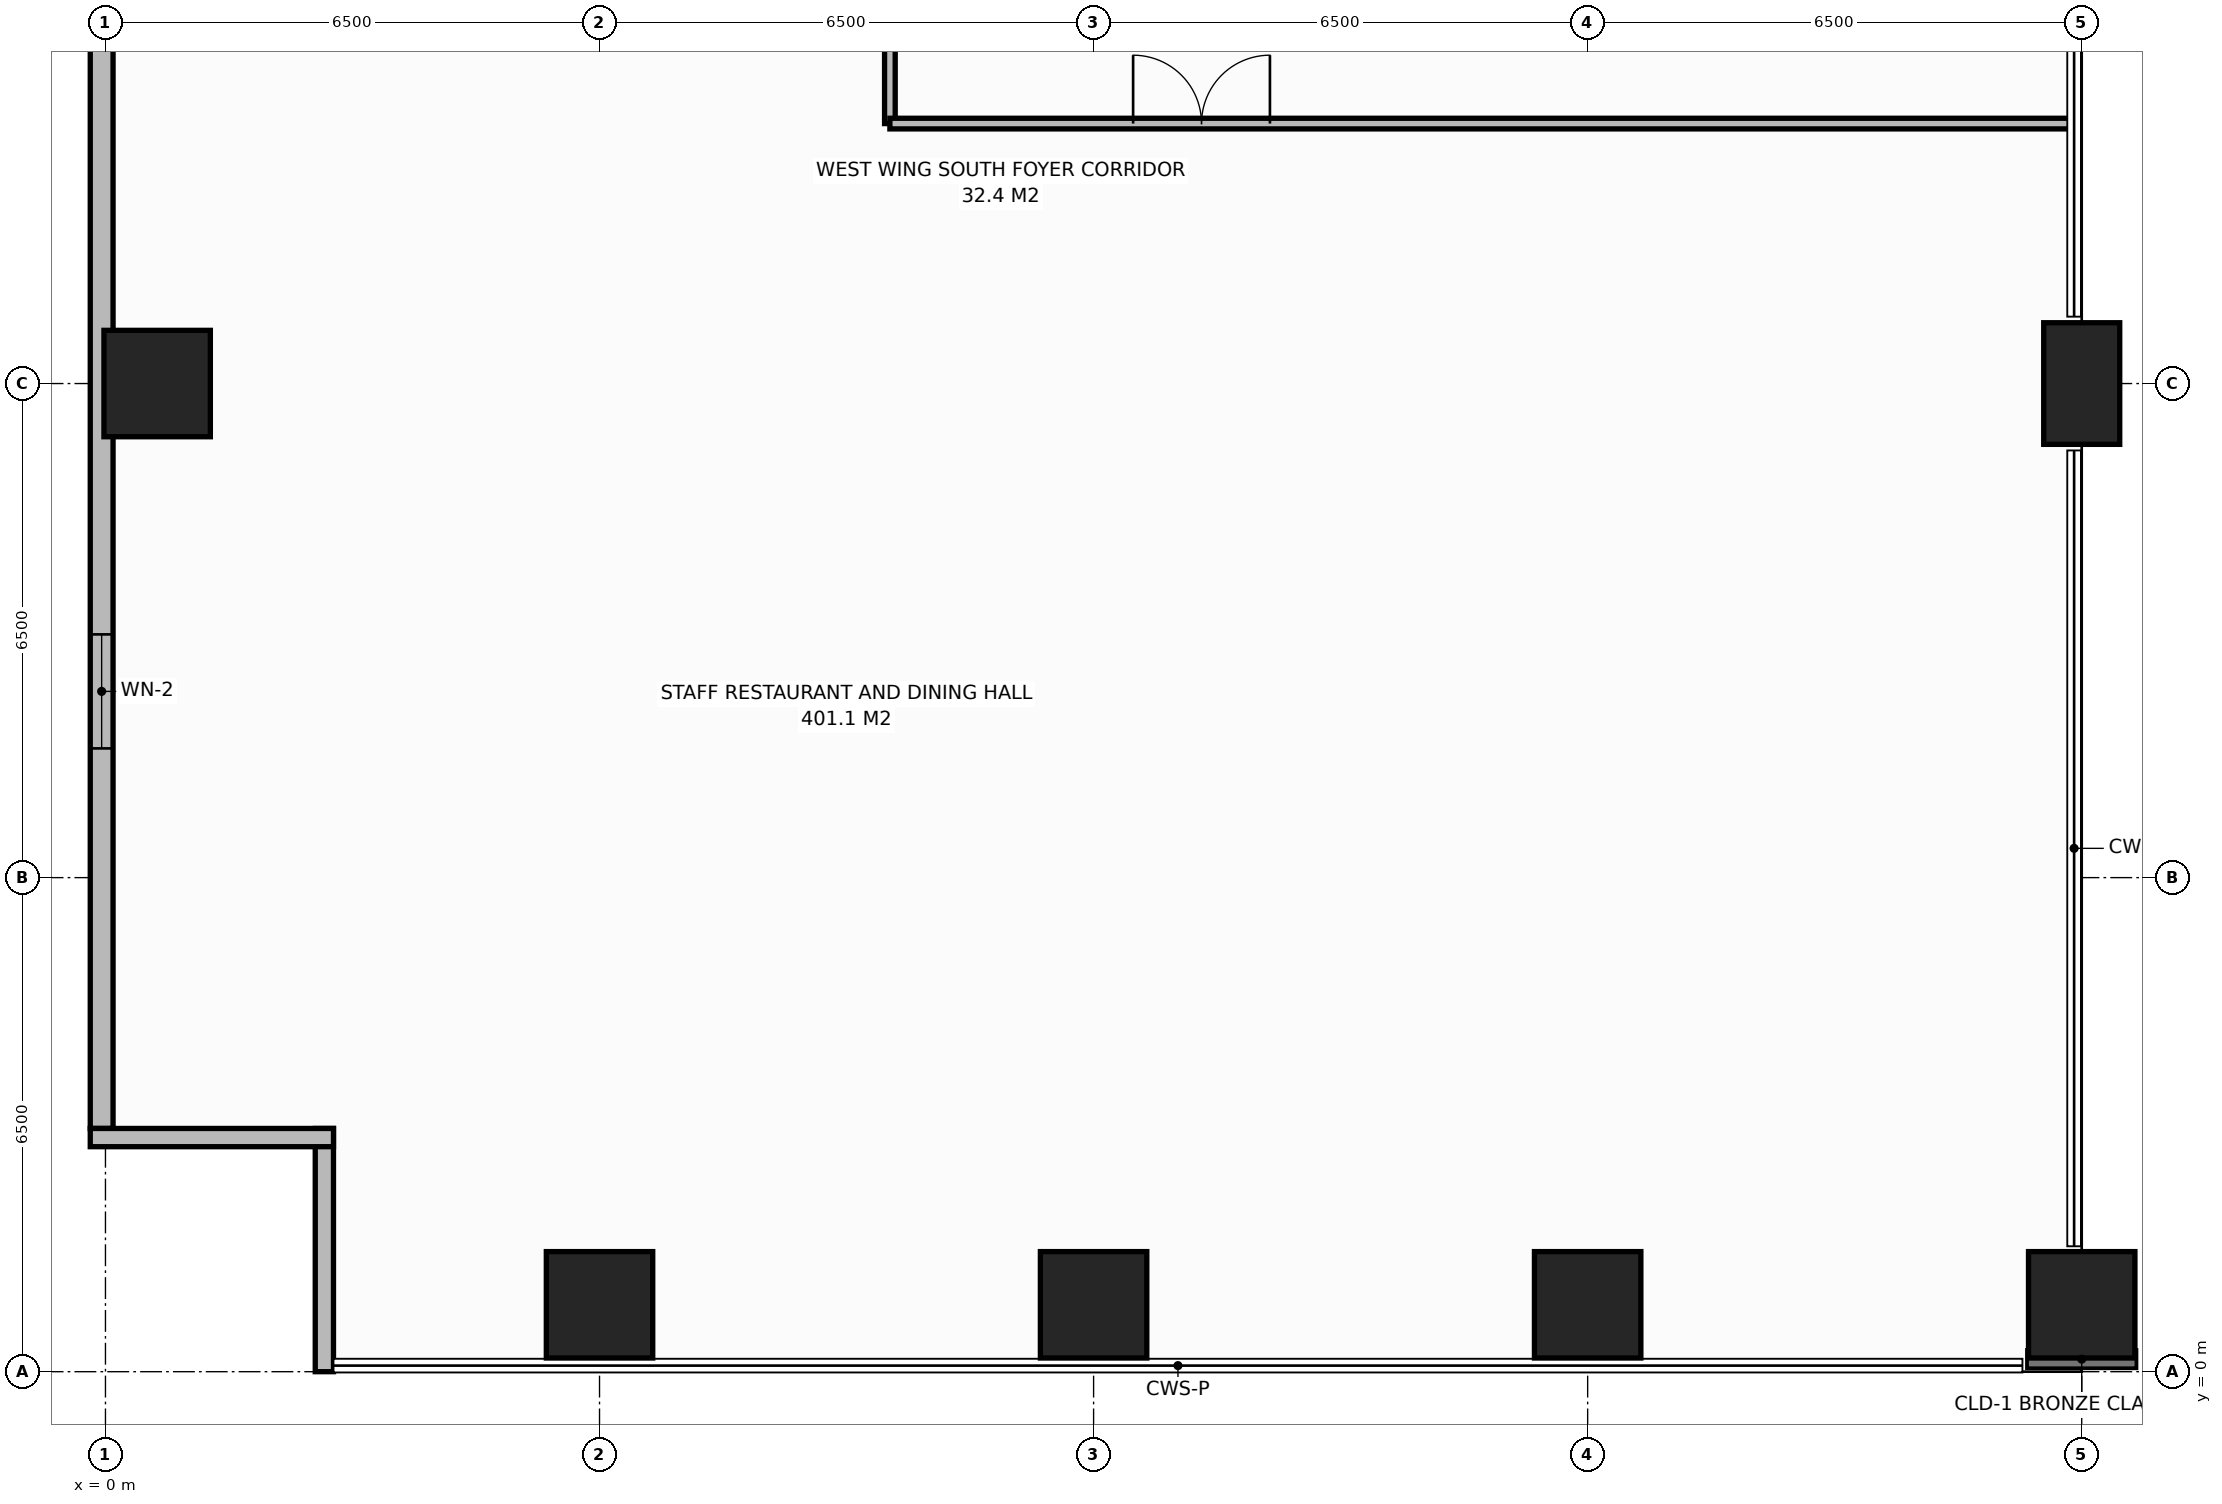
"""IFC4 building model, lengths in metres.
Left out: names, types, materials, properties, quantities, classifications, styles, units other than length and angle.
Written with IfcOpenShell. Run it as: python <this file> out.ifc"""

import sys

from ifc_helpers import new_model, si_unit, direction, frame, frame_2d, origin, origin_2d, place, context, subcontext, project, spatial, rectangle, extrude, element, fill, save


model = new_model("IFC4")
c1 = context("Model", 3, precision=1e-05, world=origin(), true_north=direction((0.0, 1.0)))
c2 = subcontext(c1, "Body", "Model", "MODEL_VIEW")
j1 = project(units=[si_unit("LENGTHUNIT", "METRE"), si_unit("PLANEANGLEUNIT", "RADIAN")], contexts=[c1])
p1 = place(None, origin())
s1 = spatial("IfcSite", under=j1, at=p1, CompositionType="ELEMENT")
p2 = place(p1, origin())
s2 = spatial("IfcBuilding", under=s1, at=p2, CompositionType="ELEMENT")
p3 = place(p2, frame((0.0, 0.0, 17.0)))
s3 = spatial("IfcBuildingStorey", under=s2, at=p3, CompositionType="ELEMENT", Elevation=17.0)
p4 = place(p3, frame((26.0, 13.0, 0.0), z_axis=(0.0, 0.0, 1.0), x_axis=(1.0, 0.0, 0.0)))
e1 = element("IfcColumn", 1, at=p4, inside=s3, PredefinedType="PILASTER", context=c2, shape_type="SweptSolid", body=[
    extrude(rectangle(XDim=1.0, YDim=1.6, at=origin_2d()), origin(), (0.0, 0.0, 1.0), 5.0),
])
for number, where, z_axis, x_axis in (
    (2, (6.5, 0.88, 0.0), (0.0, 0.0, 1.0), (1.0, 0.0, 0.0)),
    (3, (13.0, 0.88, 0.0), (0.0, 0.0, 1.0), (1.0, 0.0, 0.0)),
    (4, (19.5, 0.88, 0.0), (0.0, 0.0, 1.0), (1.0, 0.0, 0.0)),
    (5, (26.0, 0.88, 0.0), (0.0, 0.0, 1.0), (1.0, 0.0, 0.0)),
    (6, (0.68, 13.0, 0.0), (0.0, 0.0, 1.0), (1.0, 0.0, 0.0)),
):
    element("IfcColumn", number, at=place(p3, frame(where, z_axis=z_axis, x_axis=x_axis)), inside=s3, PredefinedType="COLUMN", context=c2, shape_type="SweptSolid", body=[
        extrude(rectangle(XDim=1.4, YDim=1.4, at=origin_2d()), origin(), (0.0, 0.0, 1.0), 5.0),
    ])
p5 = place(p3, frame((-0.05, 3.2, 0.0), z_axis=(0.0, 0.0, 1.0), x_axis=(0.0, 1.0, 0.0)))
e7 = element("IfcWall", 7, at=p5, inside=s3, PredefinedType="STANDARD", context=c2, shape_type="SweptSolid", body=[
    extrude(rectangle(XDim=45.6, YDim=0.3, at=frame_2d((22.8, 0.0))), origin(), (0.0, 0.0, 1.0), 4.4),
])
p6 = place(p5, frame((5.0, 0.0, 0.9)))
e8 = element("IfcOpeningElement", 8, at=p6, cuts=e7, PredefinedType="OPENING", context=c2, shape_type="SweptSolid", body=[
    extrude(rectangle(XDim=1.5, YDim=2.2, at=frame_2d((0.75, 1.1))), frame((0.0, 0.16, 0.0), z_axis=(0.0, -1.0, 0.0), x_axis=(1.0, 0.0, 0.0)), (0.0, 0.0, 1.0), 0.32),
])
p7 = place(p5, frame((14.5, 0.0, 0.9)))
e9 = element("IfcOpeningElement", 9, at=p7, cuts=e7, PredefinedType="OPENING", context=c2, shape_type="SweptSolid", body=[
    extrude(rectangle(XDim=1.5, YDim=2.2, at=frame_2d((0.75, 1.1))), frame((0.0, 0.16, 0.0), z_axis=(0.0, -1.0, 0.0), x_axis=(1.0, 0.0, 0.0)), (0.0, 0.0, 1.0), 0.32),
])
p8 = place(p5, frame((25.5, 0.0, 0.9)))
e10 = element("IfcOpeningElement", 10, at=p8, cuts=e7, PredefinedType="OPENING", context=c2, shape_type="SweptSolid", body=[
    extrude(rectangle(XDim=1.5, YDim=2.2, at=frame_2d((0.75, 1.1))), frame((0.0, 0.16, 0.0), z_axis=(0.0, -1.0, 0.0), x_axis=(1.0, 0.0, 0.0)), (0.0, 0.0, 1.0), 0.32),
])
p9 = place(p5, frame((35.0, 0.0, 0.9)))
e11 = element("IfcOpeningElement", 11, at=p9, cuts=e7, PredefinedType="OPENING", context=c2, shape_type="SweptSolid", body=[
    extrude(rectangle(XDim=1.5, YDim=2.2, at=frame_2d((0.75, 1.1))), frame((0.0, 0.16, 0.0), z_axis=(0.0, -1.0, 0.0), x_axis=(1.0, 0.0, 0.0)), (0.0, 0.0, 1.0), 0.32),
])
for number, where, z_axis, x_axis in (
    (12, (2.88, 0.0, 0.0), (0.0, 0.0, 1.0), (0.0, 1.0, 0.0)),
    (13, (3.0, 3.08, 0.0), (0.0, 0.0, 1.0), (-1.0, 0.0, 0.0)),
):
    element("IfcWall", number, at=place(p3, frame(where, z_axis=z_axis, x_axis=x_axis)), inside=s3, PredefinedType="STANDARD", context=c2, shape_type="SweptSolid", body=[
        extrude(rectangle(XDim=3.2, YDim=0.24, at=frame_2d((1.6, 0.0))), origin(), (0.0, 0.0, 1.0), 4.4),
    ])
p10 = place(p3, frame((10.32, 16.42, 0.0), z_axis=(0.0, 0.0, 1.0), x_axis=(0.0, 1.0, 0.0)))
e14 = element("IfcWall", 14, at=p10, inside=s3, PredefinedType="PARTITIONING", context=c2, shape_type="SweptSolid", body=[
    extrude(rectangle(XDim=2.18, YDim=0.14, at=frame_2d((1.09, 0.0))), origin(), (0.0, 0.0, 1.0), 4.4),
])
p11 = place(p3, frame((10.32, 16.42, 0.0), z_axis=(0.0, 0.0, 1.0), x_axis=(1.0, 0.0, 0.0)))
e15 = element("IfcWall", 15, at=p11, inside=s3, PredefinedType="PARTITIONING", context=c2, shape_type="SweptSolid", body=[
    extrude(rectangle(XDim=15.6, YDim=0.14, at=frame_2d((7.8, 0.0))), origin(), (0.0, 0.0, 1.0), 4.4),
])
p12 = place(p11, frame((3.2, 0.0, 0.0)))
e16 = element("IfcOpeningElement", 16, at=p12, cuts=e15, PredefinedType="OPENING", context=c2, shape_type="SweptSolid", body=[
    extrude(rectangle(XDim=1.8, YDim=2.2, at=frame_2d((0.9, 1.1))), frame((0.0, 0.08, 0.0), z_axis=(0.0, -1.0, 0.0), x_axis=(1.0, 0.0, 0.0)), (0.0, 0.0, 1.0), 0.16),
])
p13 = place(p6, origin())
e17 = element("IfcWindow", 17, at=p13, inside=s3, PartitioningType="SINGLE_PANEL", PredefinedType="WINDOW", context=c2, shape_type="SweptSolid", body=[
    extrude(rectangle(XDim=1.5, YDim=2.2, at=frame_2d((0.75, 1.1))), frame((0.0, 0.03, 0.0), z_axis=(0.0, -1.0, 0.0), x_axis=(1.0, 0.0, 0.0)), (0.0, 0.0, 1.0), 0.06),
])
fill(e8, e17)
p14 = place(p12, origin())
e18 = element("IfcDoor", 18, at=p14, inside=s3, OperationType="DOUBLE_DOOR_SINGLE_SWING", PredefinedType="DOOR", context=c2, shape_type="SweptSolid", body=[
    extrude(rectangle(XDim=1.8, YDim=2.2, at=frame_2d((0.9, 1.1))), frame((0.0, 0.025, 0.0), z_axis=(0.0, -1.0, 0.0), x_axis=(1.0, 0.0, 0.0)), (0.0, 0.0, 1.0), 0.05),
])
fill(e16, e18)
save(model, sys.argv[1])
